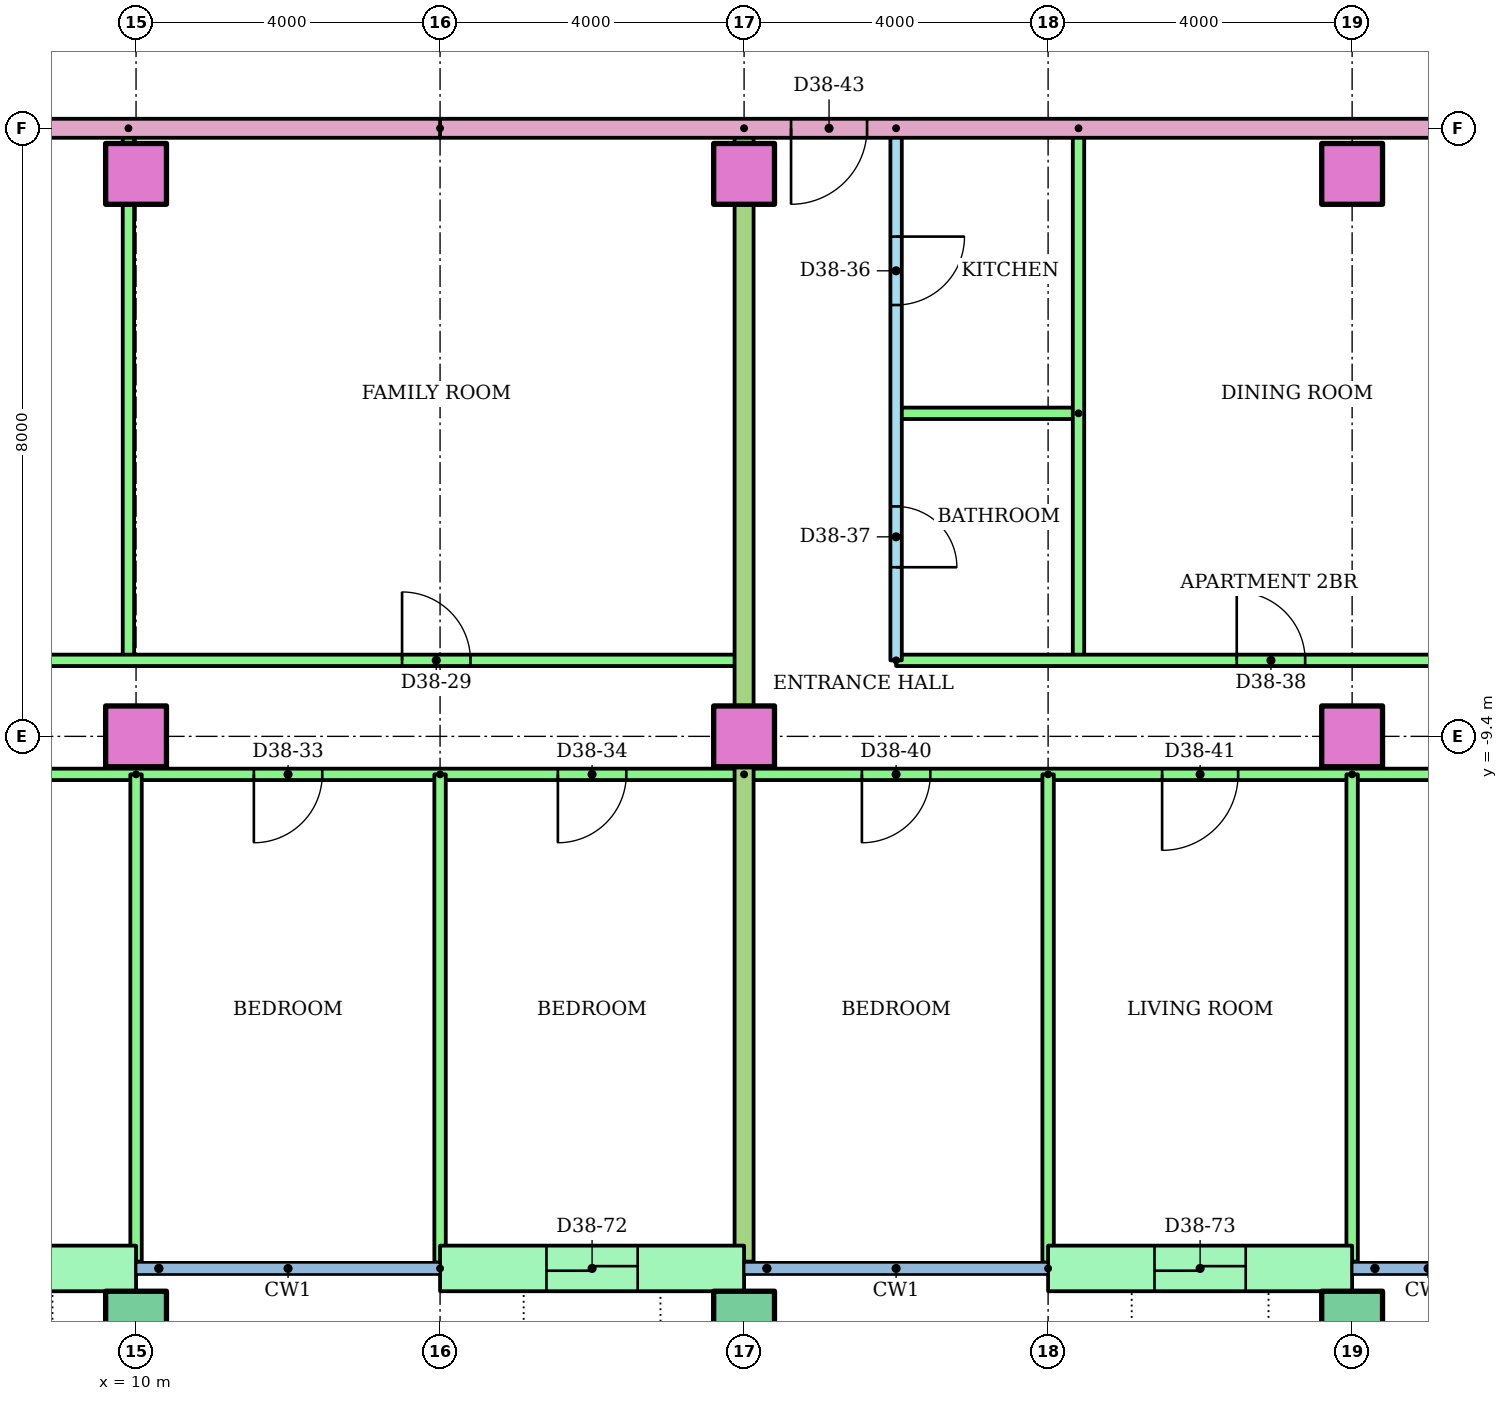
"""IFC4 building model, lengths in metres.
Left out: names, types, materials, properties, quantities, classifications, styles, units other than length and angle.
Written with IfcOpenShell. Run it as: python <this file> out.ifc"""

import sys

from ifc_helpers import new_model, si_unit, direction, frame, frame_2d, origin, origin_2d, place, context, subcontext, project, spatial, rectangle, hollow_rectangle, extrude, element, fill, save


model = new_model("IFC4")
c1 = context("Model", 3, precision=1e-05, world=origin(), true_north=direction((0.0, 1.0)))
c2 = subcontext(c1, "Body", "Model", "MODEL_VIEW")
j1 = project(units=[si_unit("LENGTHUNIT", "METRE"), si_unit("PLANEANGLEUNIT", "RADIAN")], contexts=[c1])
p1 = place(None, origin())
s1 = spatial("IfcSite", under=j1, at=p1, CompositionType="ELEMENT")
p2 = place(p1, origin())
s2 = spatial("IfcBuilding", under=s1, at=p2, CompositionType="ELEMENT")
p3 = place(p2, frame((0.0, 0.0, 145.4)))
s3 = spatial("IfcBuildingStorey", under=s2, at=p3, CompositionType="ELEMENT", Elevation=145.4)
for number, where in (
    (1, (10.0, -17.1, 0.0)),
    (2, (18.0, -17.1, 0.0)),
    (3, (26.0, -17.1, 0.0)),
):
    element("IfcColumn", number, at=place(p3, frame(where)), inside=s3, PredefinedType="COLUMN", context=c2, shape_type="SweptSolid", body=[
        extrude(hollow_rectangle(XDim=0.8, YDim=0.8, WallThickness=0.04, at=origin_2d()), origin(), (0.0, 0.0, 1.0), 3.2),
    ])
for number, where in (
    (4, (10.0, -9.4, 0.0)),
    (5, (18.0, -9.4, 0.0)),
    (6, (26.0, -9.4, 0.0)),
    (7, (10.0, -2.0, 0.0)),
    (8, (18.0, -2.0, 0.0)),
    (9, (26.0, -2.0, 0.0)),
):
    element("IfcColumn", number, at=place(p3, frame(where)), inside=s3, PredefinedType="COLUMN", context=c2, shape_type="SweptSolid", body=[
        extrude(rectangle(XDim=0.8, YDim=0.8, at=origin_2d()), origin(), (0.0, 0.0, 1.0), 3.2),
    ])
p4 = place(p3, frame((6.0, -16.4, 0.0)))
e10 = element("IfcWall", 10, at=p4, inside=s3, PredefinedType="STANDARD", context=c2, shape_type="SweptSolid", body=[
    extrude(rectangle(XDim=4.0, YDim=0.6, at=frame_2d((2.0, 0.0))), origin(), (0.0, 0.0, 1.0), 2.92),
])
p5 = place(p4, frame((1.4, 0.0, 0.0)))
e11 = element("IfcOpeningElement", 11, at=p5, cuts=e10, PredefinedType="OPENING", context=c2, shape_type="SweptSolid", body=[
    extrude(rectangle(XDim=1.2, YDim=2.1, at=frame_2d((0.6, 1.05))), frame((0.0, 0.31, 0.0), z_axis=(0.0, -1.0, 0.0), x_axis=(1.0, 0.0, 0.0)), (0.0, 0.0, 1.0), 0.62),
])
p6 = place(p3, frame((14.0, -16.4, 0.0)))
e12 = element("IfcWall", 12, at=p6, inside=s3, PredefinedType="STANDARD", context=c2, shape_type="SweptSolid", body=[
    extrude(rectangle(XDim=4.0, YDim=0.6, at=frame_2d((2.0, 0.0))), origin(), (0.0, 0.0, 1.0), 2.92),
])
p7 = place(p6, frame((1.4, 0.0, 0.0)))
e13 = element("IfcOpeningElement", 13, at=p7, cuts=e12, PredefinedType="OPENING", context=c2, shape_type="SweptSolid", body=[
    extrude(rectangle(XDim=1.2, YDim=2.1, at=frame_2d((0.6, 1.05))), frame((0.0, 0.31, 0.0), z_axis=(0.0, -1.0, 0.0), x_axis=(1.0, 0.0, 0.0)), (0.0, 0.0, 1.0), 0.62),
])
p8 = place(p3, frame((22.0, -16.4, 0.0)))
e14 = element("IfcWall", 14, at=p8, inside=s3, PredefinedType="STANDARD", context=c2, shape_type="SweptSolid", body=[
    extrude(rectangle(XDim=4.0, YDim=0.6, at=frame_2d((2.0, 0.0))), origin(), (0.0, 0.0, 1.0), 2.92),
])
p9 = place(p8, frame((1.4, 0.0, 0.0)))
e15 = element("IfcOpeningElement", 15, at=p9, cuts=e14, PredefinedType="OPENING", context=c2, shape_type="SweptSolid", body=[
    extrude(rectangle(XDim=1.2, YDim=2.1, at=frame_2d((0.6, 1.05))), frame((0.0, 0.31, 0.0), z_axis=(0.0, -1.0, 0.0), x_axis=(1.0, 0.0, 0.0)), (0.0, 0.0, 1.0), 0.62),
])
p10 = place(p3, frame((9.9, -1.4, 0.0), z_axis=(0.0, 0.0, 1.0), x_axis=(0.0, -1.0, 0.0)))
e16 = element("IfcWall", 16, at=p10, inside=s3, PredefinedType="PARTITIONING", context=c2, shape_type="SweptSolid", body=[
    extrude(rectangle(XDim=7.0, YDim=0.15, at=frame_2d((3.5, 0.0))), origin(), (0.0, 0.0, 1.0), 2.4),
])
p11 = place(p3, frame((-4.0, -8.4, 0.0)))
e17 = element("IfcWall", 17, at=p11, inside=s3, PredefinedType="PARTITIONING", context=c2, shape_type="SweptSolid", body=[
    extrude(rectangle(XDim=22.0, YDim=0.15, at=frame_2d((11.0, 0.0))), origin(), (0.0, 0.0, 1.0), 2.4),
])
p12 = place(p11, frame((4.45, 0.0, 0.0)))
e18 = element("IfcOpeningElement", 18, at=p12, cuts=e17, PredefinedType="OPENING", context=c2, shape_type="SweptSolid", body=[
    extrude(rectangle(XDim=0.9, YDim=2.1, at=frame_2d((0.45, 1.05))), frame((0.0, 0.085, 0.0), z_axis=(0.0, -1.0, 0.0), x_axis=(1.0, 0.0, 0.0)), (0.0, 0.0, 1.0), 0.17),
])
p13 = place(p11, frame((10.2, 0.0, 0.0)))
e19 = element("IfcOpeningElement", 19, at=p13, cuts=e17, PredefinedType="OPENING", context=c2, shape_type="SweptSolid", body=[
    extrude(rectangle(XDim=0.9, YDim=2.1, at=frame_2d((0.45, 1.05))), frame((0.0, 0.085, 0.0), z_axis=(0.0, -1.0, 0.0), x_axis=(1.0, 0.0, 0.0)), (0.0, 0.0, 1.0), 0.17),
])
p14 = place(p11, frame((17.5, 0.0, 0.0)))
e20 = element("IfcOpeningElement", 20, at=p14, cuts=e17, PredefinedType="OPENING", context=c2, shape_type="SweptSolid", body=[
    extrude(rectangle(XDim=0.9, YDim=2.1, at=frame_2d((0.45, 1.05))), frame((0.0, 0.085, 0.0), z_axis=(0.0, -1.0, 0.0), x_axis=(1.0, 0.0, 0.0)), (0.0, 0.0, 1.0), 0.17),
])
p15 = place(p3, frame((18.0, -9.9, 0.0), z_axis=(0.0, 0.0, 1.0), x_axis=(-1.0, 0.0, 0.0)))
e21 = element("IfcWall", 21, at=p15, inside=s3, PredefinedType="PARTITIONING", context=c2, shape_type="SweptSolid", body=[
    extrude(rectangle(XDim=24.0, YDim=0.15, at=frame_2d((12.0, 0.0))), origin(), (0.0, 0.0, 1.0), 2.4),
])
p16 = place(p15, frame((19.5, 0.0, 0.0)))
e22 = element("IfcOpeningElement", 22, at=p16, cuts=e21, PredefinedType="OPENING", context=c2, shape_type="SweptSolid", body=[
    extrude(rectangle(XDim=1.0, YDim=2.1, at=frame_2d((0.5, 1.05))), frame((0.0, 0.085, 0.0), z_axis=(0.0, -1.0, 0.0), x_axis=(1.0, 0.0, 0.0)), (0.0, 0.0, 1.0), 0.17),
])
p17 = place(p15, frame((13.55, 0.0, 0.0)))
e23 = element("IfcOpeningElement", 23, at=p17, cuts=e21, PredefinedType="OPENING", context=c2, shape_type="SweptSolid", body=[
    extrude(rectangle(XDim=0.9, YDim=2.1, at=frame_2d((0.45, 1.05))), frame((0.0, 0.085, 0.0), z_axis=(0.0, -1.0, 0.0), x_axis=(1.0, 0.0, 0.0)), (0.0, 0.0, 1.0), 0.17),
])
p18 = place(p15, frame((9.55, 0.0, 0.0)))
e24 = element("IfcOpeningElement", 24, at=p18, cuts=e21, PredefinedType="OPENING", context=c2, shape_type="SweptSolid", body=[
    extrude(rectangle(XDim=0.9, YDim=2.1, at=frame_2d((0.45, 1.05))), frame((0.0, 0.085, 0.0), z_axis=(0.0, -1.0, 0.0), x_axis=(1.0, 0.0, 0.0)), (0.0, 0.0, 1.0), 0.17),
])
p19 = place(p15, frame((5.55, 0.0, 0.0)))
e25 = element("IfcOpeningElement", 25, at=p19, cuts=e21, PredefinedType="OPENING", context=c2, shape_type="SweptSolid", body=[
    extrude(rectangle(XDim=0.9, YDim=2.1, at=frame_2d((0.45, 1.05))), frame((0.0, 0.085, 0.0), z_axis=(0.0, -1.0, 0.0), x_axis=(1.0, 0.0, 0.0)), (0.0, 0.0, 1.0), 0.17),
])
p20 = place(p15, frame((1.55, 0.0, 0.0)))
e26 = element("IfcOpeningElement", 26, at=p20, cuts=e21, PredefinedType="OPENING", context=c2, shape_type="SweptSolid", body=[
    extrude(rectangle(XDim=0.9, YDim=2.1, at=frame_2d((0.45, 1.05))), frame((0.0, 0.085, 0.0), z_axis=(0.0, -1.0, 0.0), x_axis=(1.0, 0.0, 0.0)), (0.0, 0.0, 1.0), 0.17),
])
p21 = place(p3, frame((10.0, -9.9, 0.0), z_axis=(0.0, 0.0, 1.0), x_axis=(0.0, -1.0, 0.0)))
e27 = element("IfcWall", 27, at=p21, inside=s3, PredefinedType="PARTITIONING", context=c2, shape_type="SweptSolid", body=[
    extrude(rectangle(XDim=6.41, YDim=0.15, at=frame_2d((3.205, 0.0))), origin(), (0.0, 0.0, 1.0), 2.4),
])
p22 = place(p3, frame((14.0, -9.9, 0.0), z_axis=(0.0, 0.0, 1.0), x_axis=(0.0, -1.0, 0.0)))
e28 = element("IfcWall", 28, at=p22, inside=s3, PredefinedType="PARTITIONING", context=c2, shape_type="SweptSolid", body=[
    extrude(rectangle(XDim=6.421, YDim=0.15, at=frame_2d((3.21, 0.0))), origin(), (0.0, 0.0, 1.0), 2.4),
])
p23 = place(p3, frame((20.0, -1.4, 0.0), z_axis=(0.0, 0.0, 1.0), x_axis=(0.0, -1.0, 0.0)))
e29 = element("IfcWall", 29, at=p23, inside=s3, PredefinedType="PARTITIONING", context=c2, shape_type="SweptSolid", body=[
    extrude(rectangle(XDim=7.0, YDim=0.15, at=frame_2d((3.5, 0.0))), origin(), (0.0, 0.0, 1.0), 2.4),
])
p24 = place(p23, frame((1.425, 0.0, 0.0)))
e30 = element("IfcOpeningElement", 30, at=p24, cuts=e29, PredefinedType="OPENING", context=c2, shape_type="SweptSolid", body=[
    extrude(rectangle(XDim=0.9, YDim=2.1, at=frame_2d((0.45, 1.05))), frame((0.0, 0.085, 0.0), z_axis=(0.0, -1.0, 0.0), x_axis=(1.0, 0.0, 0.0)), (0.0, 0.0, 1.0), 0.17),
])
p25 = place(p23, frame((4.975, 0.0, 0.0)))
e31 = element("IfcOpeningElement", 31, at=p25, cuts=e29, PredefinedType="OPENING", context=c2, shape_type="SweptSolid", body=[
    extrude(rectangle(XDim=0.8, YDim=2.1, at=frame_2d((0.4, 1.05))), frame((0.0, 0.085, 0.0), z_axis=(0.0, -1.0, 0.0), x_axis=(1.0, 0.0, 0.0)), (0.0, 0.0, 1.0), 0.17),
])
p26 = place(p3, frame((22.4, -5.15, 0.0), z_axis=(0.0, 0.0, 1.0), x_axis=(-1.0, 0.0, 0.0)))
e32 = element("IfcWall", 32, at=p26, inside=s3, PredefinedType="PARTITIONING", context=c2, shape_type="SweptSolid", body=[
    extrude(rectangle(XDim=2.4, YDim=0.15, at=frame_2d((1.2, 0.0))), origin(), (0.0, 0.0, 1.0), 2.4),
])
p27 = place(p3, frame((22.4, -1.4, 0.0), z_axis=(0.0, 0.0, 1.0), x_axis=(0.0, -1.0, 0.0)))
e33 = element("IfcWall", 33, at=p27, inside=s3, PredefinedType="PARTITIONING", context=c2, shape_type="SweptSolid", body=[
    extrude(rectangle(XDim=7.0, YDim=0.15, at=frame_2d((3.5, 0.0))), origin(), (0.0, 0.0, 1.0), 2.4),
])
p28 = place(p3, frame((20.0, -8.4, 0.0)))
e34 = element("IfcWall", 34, at=p28, inside=s3, PredefinedType="PARTITIONING", context=c2, shape_type="SweptSolid", body=[
    extrude(rectangle(XDim=12.72, YDim=0.15, at=frame_2d((6.36, 0.0))), origin(), (0.0, 0.0, 1.0), 2.4),
])
p29 = place(p28, frame((4.482, 0.0, 0.0)))
e35 = element("IfcOpeningElement", 35, at=p29, cuts=e34, PredefinedType="OPENING", context=c2, shape_type="SweptSolid", body=[
    extrude(rectangle(XDim=0.9, YDim=2.1, at=frame_2d((0.45, 1.05))), frame((0.0, 0.085, 0.0), z_axis=(0.0, -1.0, 0.0), x_axis=(1.0, 0.0, 0.0)), (0.0, 0.0, 1.0), 0.17),
])
p30 = place(p28, frame((9.875, 0.0, 0.0)))
e36 = element("IfcOpeningElement", 36, at=p30, cuts=e34, PredefinedType="OPENING", context=c2, shape_type="SweptSolid", body=[
    extrude(rectangle(XDim=0.9, YDim=2.1, at=frame_2d((0.45, 1.05))), frame((0.0, 0.085, 0.0), z_axis=(0.0, -1.0, 0.0), x_axis=(1.0, 0.0, 0.0)), (0.0, 0.0, 1.0), 0.17),
])
p31 = place(p3, frame((32.72, -9.9, 0.0), z_axis=(0.0, 0.0, 1.0), x_axis=(-1.0, 0.0, 0.0)))
e37 = element("IfcWall", 37, at=p31, inside=s3, PredefinedType="PARTITIONING", context=c2, shape_type="SweptSolid", body=[
    extrude(rectangle(XDim=14.72, YDim=0.15, at=frame_2d((7.36, 0.0))), origin(), (0.0, 0.0, 1.0), 2.4),
])
p32 = place(p31, frame((12.27, 0.0, 0.0)))
e38 = element("IfcOpeningElement", 38, at=p32, cuts=e37, PredefinedType="OPENING", context=c2, shape_type="SweptSolid", body=[
    extrude(rectangle(XDim=0.9, YDim=2.1, at=frame_2d((0.45, 1.05))), frame((0.0, 0.085, 0.0), z_axis=(0.0, -1.0, 0.0), x_axis=(1.0, 0.0, 0.0)), (0.0, 0.0, 1.0), 0.17),
])
p33 = place(p31, frame((8.22, 0.0, 0.0)))
e39 = element("IfcOpeningElement", 39, at=p33, cuts=e37, PredefinedType="OPENING", context=c2, shape_type="SweptSolid", body=[
    extrude(rectangle(XDim=1.0, YDim=2.1, at=frame_2d((0.5, 1.05))), frame((0.0, 0.085, 0.0), z_axis=(0.0, -1.0, 0.0), x_axis=(1.0, 0.0, 0.0)), (0.0, 0.0, 1.0), 0.17),
])
p34 = place(p31, frame((3.02, 0.0, 0.0)))
e40 = element("IfcOpeningElement", 40, at=p34, cuts=e37, PredefinedType="OPENING", context=c2, shape_type="SweptSolid", body=[
    extrude(rectangle(XDim=0.9, YDim=2.1, at=frame_2d((0.45, 1.05))), frame((0.0, 0.085, 0.0), z_axis=(0.0, -1.0, 0.0), x_axis=(1.0, 0.0, 0.0)), (0.0, 0.0, 1.0), 0.17),
])
p35 = place(p3, frame((22.0, -9.9, 0.0), z_axis=(0.0, 0.0, 1.0), x_axis=(0.0, -1.0, 0.0)))
e41 = element("IfcWall", 41, at=p35, inside=s3, PredefinedType="PARTITIONING", context=c2, shape_type="SweptSolid", body=[
    extrude(rectangle(XDim=6.421, YDim=0.15, at=frame_2d((3.21, 0.0))), origin(), (0.0, 0.0, 1.0), 2.4),
])
p36 = place(p3, frame((26.0, -9.9, 0.0), z_axis=(0.0, 0.0, 1.0), x_axis=(0.0, -1.0, 0.0)))
e42 = element("IfcWall", 42, at=p36, inside=s3, PredefinedType="PARTITIONING", context=c2, shape_type="SweptSolid", body=[
    extrude(rectangle(XDim=6.41, YDim=0.15, at=frame_2d((3.205, 0.0))), origin(), (0.0, 0.0, 1.0), 2.4),
])
p37 = place(p3, frame((18.0, -1.4, 0.0), z_axis=(0.0, 0.0, 1.0), x_axis=(0.0, -1.0, 0.0)))
e43 = element("IfcWall", 43, at=p37, inside=s3, PredefinedType="PARTITIONING", context=c2, shape_type="SweptSolid", body=[
    extrude(rectangle(XDim=14.91, YDim=0.25, at=frame_2d((7.455, 0.0))), origin(), (0.0, 0.0, 1.0), 2.4),
])
p38 = place(p3, frame((29.0, -1.4, 0.0), z_axis=(0.0, 0.0, 1.0), x_axis=(-1.0, 0.0, 0.0)))
e44 = element("IfcWall", 44, at=p38, inside=s3, PredefinedType="PARTITIONING", context=c2, shape_type="SweptSolid", body=[
    extrude(rectangle(XDim=15.0, YDim=0.25, at=frame_2d((7.5, 0.0))), origin(), (0.0, 0.0, 1.0), 2.4),
])
p39 = place(p38, frame((9.382, 0.0, 0.0)))
e45 = element("IfcOpeningElement", 45, at=p39, cuts=e44, PredefinedType="OPENING", context=c2, shape_type="SweptSolid", body=[
    extrude(rectangle(XDim=1.0, YDim=2.1, at=frame_2d((0.5, 1.05))), frame((0.0, 0.135, 0.0), z_axis=(0.0, -1.0, 0.0), x_axis=(1.0, 0.0, 0.0)), (0.0, 0.0, 1.0), 0.27),
])
p40 = place(p3, frame((14.0, -1.4, 0.0), z_axis=(0.0, 0.0, 1.0), x_axis=(-1.0, 0.0, 0.0)))
e46 = element("IfcWall", 46, at=p40, inside=s3, PredefinedType="PARTITIONING", context=c2, shape_type="SweptSolid", body=[
    extrude(rectangle(XDim=28.0, YDim=0.25, at=frame_2d((14.0, 0.0))), origin(), (0.0, 0.0, 1.0), 2.4),
])
p41 = place(p40, frame((20.618, 0.0, 0.0)))
e47 = element("IfcOpeningElement", 47, at=p41, cuts=e46, PredefinedType="OPENING", context=c2, shape_type="SweptSolid", body=[
    extrude(rectangle(XDim=1.0, YDim=2.1, at=frame_2d((0.5, 1.05))), frame((0.0, 0.135, 0.0), z_axis=(0.0, -1.0, 0.0), x_axis=(1.0, 0.0, 0.0)), (0.0, 0.0, 1.0), 0.27),
])
p42 = place(p40, frame((18.382, 0.0, 0.0)))
e48 = element("IfcOpeningElement", 48, at=p42, cuts=e46, PredefinedType="OPENING", context=c2, shape_type="SweptSolid", body=[
    extrude(rectangle(XDim=1.0, YDim=2.1, at=frame_2d((0.5, 1.05))), frame((0.0, 0.135, 0.0), z_axis=(0.0, -1.0, 0.0), x_axis=(1.0, 0.0, 0.0)), (0.0, 0.0, 1.0), 0.27),
])
p43 = place(p14, origin())
e49 = element("IfcDoor", 49, at=p43, inside=s3, OperationType="SINGLE_SWING_LEFT", PredefinedType="DOOR", context=c2, shape_type="SweptSolid", body=[
    extrude(rectangle(XDim=0.9, YDim=2.1, at=frame_2d((0.45, 1.05))), frame((0.0, 0.025, 0.0), z_axis=(0.0, -1.0, 0.0), x_axis=(1.0, 0.0, 0.0)), (0.0, 0.0, 1.0), 0.05),
])
fill(e20, e49)
p44 = place(p19, origin())
e50 = element("IfcDoor", 50, at=p44, inside=s3, OperationType="SINGLE_SWING_RIGHT", PredefinedType="DOOR", context=c2, shape_type="SweptSolid", body=[
    extrude(rectangle(XDim=0.9, YDim=2.1, at=frame_2d((0.45, 1.05))), frame((0.0, 0.025, 0.0), z_axis=(0.0, -1.0, 0.0), x_axis=(1.0, 0.0, 0.0)), (0.0, 0.0, 1.0), 0.05),
])
fill(e25, e50)
p45 = place(p20, origin())
e51 = element("IfcDoor", 51, at=p45, inside=s3, OperationType="SINGLE_SWING_RIGHT", PredefinedType="DOOR", context=c2, shape_type="SweptSolid", body=[
    extrude(rectangle(XDim=0.9, YDim=2.1, at=frame_2d((0.45, 1.05))), frame((0.0, 0.025, 0.0), z_axis=(0.0, -1.0, 0.0), x_axis=(1.0, 0.0, 0.0)), (0.0, 0.0, 1.0), 0.05),
])
fill(e26, e51)
p46 = place(p24, origin())
e52 = element("IfcDoor", 52, at=p46, inside=s3, OperationType="SINGLE_SWING_LEFT", PredefinedType="DOOR", context=c2, shape_type="SweptSolid", body=[
    extrude(rectangle(XDim=0.9, YDim=2.1, at=frame_2d((0.45, 1.05))), frame((0.0, 0.025, 0.0), z_axis=(0.0, -1.0, 0.0), x_axis=(1.0, 0.0, 0.0)), (0.0, 0.0, 1.0), 0.05),
])
fill(e30, e52)
p47 = place(p25, origin())
e53 = element("IfcDoor", 53, at=p47, inside=s3, OperationType="SINGLE_SWING_RIGHT", PredefinedType="DOOR", context=c2, shape_type="SweptSolid", body=[
    extrude(rectangle(XDim=0.8, YDim=2.1, at=frame_2d((0.4, 1.05))), frame((0.0, 0.025, 0.0), z_axis=(0.0, -1.0, 0.0), x_axis=(1.0, 0.0, 0.0)), (0.0, 0.0, 1.0), 0.05),
])
fill(e31, e53)
p48 = place(p29, origin())
e54 = element("IfcDoor", 54, at=p48, inside=s3, OperationType="SINGLE_SWING_LEFT", PredefinedType="DOOR", context=c2, shape_type="SweptSolid", body=[
    extrude(rectangle(XDim=0.9, YDim=2.1, at=frame_2d((0.45, 1.05))), frame((0.0, 0.025, 0.0), z_axis=(0.0, -1.0, 0.0), x_axis=(1.0, 0.0, 0.0)), (0.0, 0.0, 1.0), 0.05),
])
fill(e35, e54)
p49 = place(p32, origin())
e55 = element("IfcDoor", 55, at=p49, inside=s3, OperationType="SINGLE_SWING_RIGHT", PredefinedType="DOOR", context=c2, shape_type="SweptSolid", body=[
    extrude(rectangle(XDim=0.9, YDim=2.1, at=frame_2d((0.45, 1.05))), frame((0.0, 0.025, 0.0), z_axis=(0.0, -1.0, 0.0), x_axis=(1.0, 0.0, 0.0)), (0.0, 0.0, 1.0), 0.05),
])
fill(e38, e55)
p50 = place(p33, origin())
e56 = element("IfcDoor", 56, at=p50, inside=s3, OperationType="SINGLE_SWING_RIGHT", PredefinedType="DOOR", context=c2, shape_type="SweptSolid", body=[
    extrude(rectangle(XDim=1.0, YDim=2.1, at=frame_2d((0.5, 1.05))), frame((0.0, 0.025, 0.0), z_axis=(0.0, -1.0, 0.0), x_axis=(1.0, 0.0, 0.0)), (0.0, 0.0, 1.0), 0.05),
])
fill(e39, e56)
p51 = place(p39, origin())
e57 = element("IfcDoor", 57, at=p51, inside=s3, OperationType="SINGLE_SWING_RIGHT", PredefinedType="DOOR", context=c2, shape_type="SweptSolid", body=[
    extrude(rectangle(XDim=1.0, YDim=2.1, at=frame_2d((0.5, 1.05))), frame((0.0, 0.025, 0.0), z_axis=(0.0, -1.0, 0.0), x_axis=(1.0, 0.0, 0.0)), (0.0, 0.0, 1.0), 0.05),
])
fill(e45, e57)
p52 = place(p7, origin())
e58 = element("IfcDoor", 58, at=p52, inside=s3, OperationType="SLIDING_TO_LEFT", PredefinedType="DOOR", context=c2, shape_type="SweptSolid", body=[
    extrude(rectangle(XDim=1.2, YDim=2.1, at=frame_2d((0.6, 1.05))), frame((0.0, 0.025, 0.0), z_axis=(0.0, -1.0, 0.0), x_axis=(1.0, 0.0, 0.0)), (0.0, 0.0, 1.0), 0.05),
])
fill(e13, e58)
p53 = place(p9, origin())
e59 = element("IfcDoor", 59, at=p53, inside=s3, OperationType="SLIDING_TO_LEFT", PredefinedType="DOOR", context=c2, shape_type="SweptSolid", body=[
    extrude(rectangle(XDim=1.2, YDim=2.1, at=frame_2d((0.6, 1.05))), frame((0.0, 0.025, 0.0), z_axis=(0.0, -1.0, 0.0), x_axis=(1.0, 0.0, 0.0)), (0.0, 0.0, 1.0), 0.05),
])
fill(e15, e59)
save(model, sys.argv[1])
